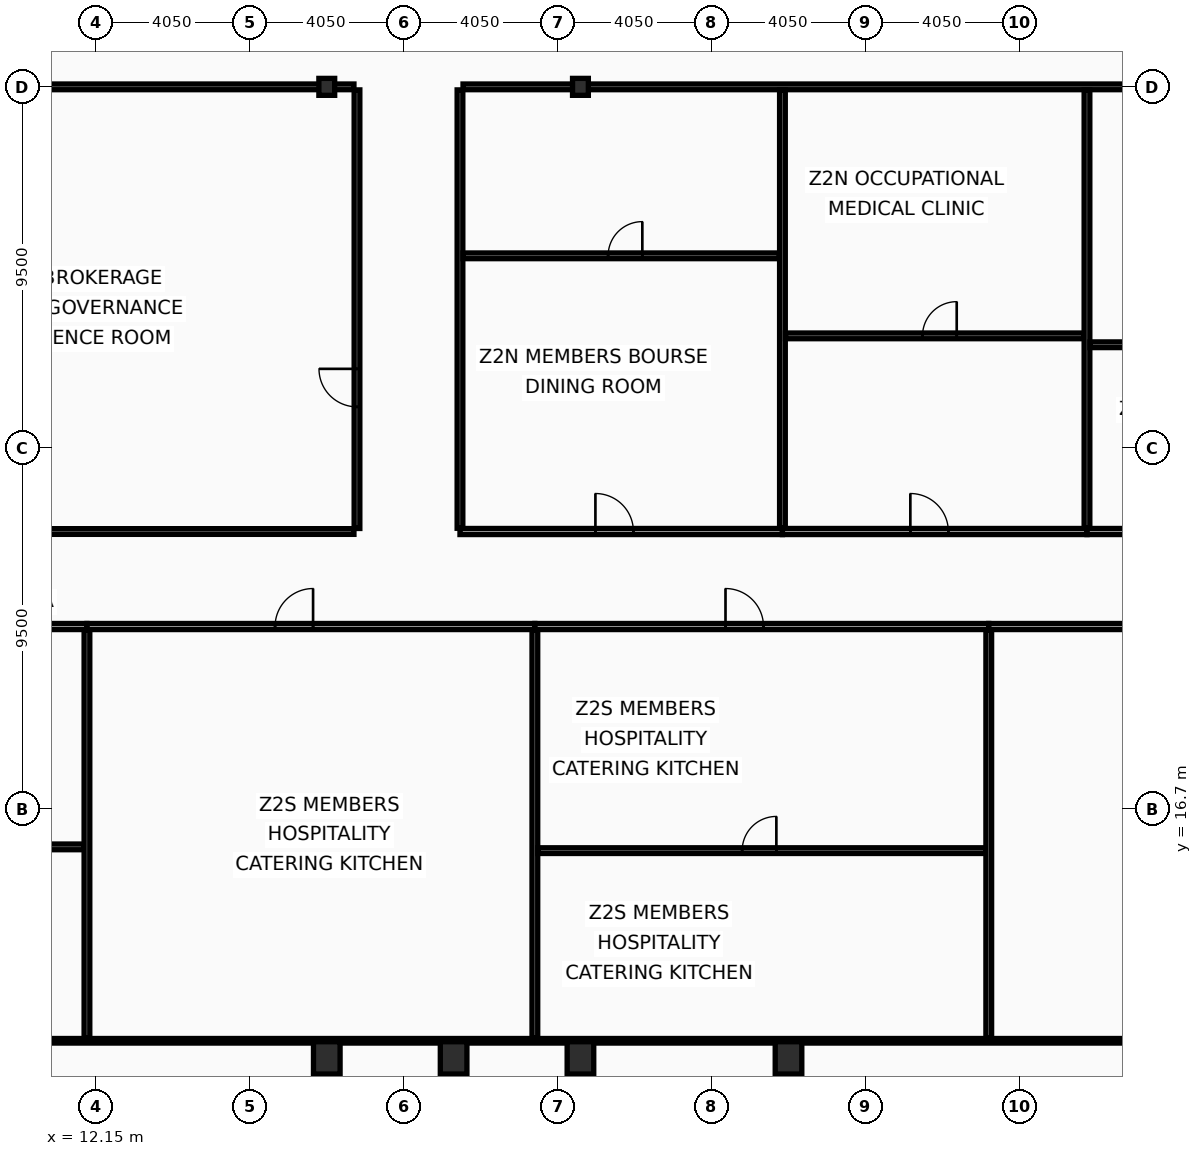
"""IFC4 building model, lengths in metres.
Left out: names, types, materials, properties, quantities, classifications, styles, units other than length and angle.
Written with IfcOpenShell. Run it as: python <this file> out.ifc"""

import sys

from ifc_helpers import new_model, si_unit, direction, frame, frame_2d, origin, origin_2d, place, context, subcontext, project, spatial, rectangle, hollow_rectangle, i_section, extrude, element, fill, save


model = new_model("IFC4")
c1 = context("Model", 3, precision=1e-05, world=origin(), true_north=direction((0.0, 1.0)))
c2 = subcontext(c1, "Body", "Model", "MODEL_VIEW")
j1 = project(units=[si_unit("LENGTHUNIT", "METRE"), si_unit("PLANEANGLEUNIT", "RADIAN")], contexts=[c1])
p1 = place(None, origin())
s1 = spatial("IfcSite", under=j1, at=p1, CompositionType="ELEMENT")
p2 = place(p1, origin())
s2 = spatial("IfcBuilding", under=s1, at=p2, CompositionType="ELEMENT")
p3 = place(p2, frame((0.0, 0.0, 129.0)))
s3 = spatial("IfcBuildingStorey", under=s2, at=p3, CompositionType="ELEMENT", Elevation=129.0)
for number, where, z_axis, x_axis in (
    (1, (18.225, 10.15, 0.0), (0.0, 0.0, 1.0), (1.0, 0.0, 0.0)),
    (2, (21.562, 10.15, 0.0), (0.0, 0.0, 1.0), (1.0, 0.0, 0.0)),
    (3, (24.9, 10.15, 0.0), (0.0, 0.0, 1.0), (1.0, 0.0, 0.0)),
    (4, (30.375, 10.15, 0.0), (0.0, 0.0, 1.0), (1.0, 0.0, 0.0)),
):
    element("IfcColumn", number, at=place(p3, frame(where, z_axis=z_axis, x_axis=x_axis)), inside=s3, PredefinedType="COLUMN", context=c2, shape_type="SweptSolid", body=[
        extrude(hollow_rectangle(XDim=0.7, YDim=0.85, WallThickness=0.05, at=origin_2d()), origin(), (0.0, 0.0, 1.0), 3.6),
    ])
for number, where, z_axis, x_axis in (
    (5, (18.225, 35.7, 0.0), (0.0, 0.0, 1.0), (1.0, 0.0, 0.0)),
    (6, (24.9, 35.7, 0.0), (0.0, 0.0, 1.0), (1.0, 0.0, 0.0)),
):
    element("IfcColumn", number, at=place(p3, frame(where, z_axis=z_axis, x_axis=x_axis)), inside=s3, PredefinedType="COLUMN", context=c2, shape_type="SweptSolid", body=[
        extrude(i_section(OverallWidth=0.416, OverallDepth=0.446, WebThickness=0.039, FlangeThickness=0.063, at=origin_2d()), origin(), (0.0, 0.0, 1.0), 3.6),
    ])
p4 = place(p3, frame((4.03, 21.5, 0.0), z_axis=(0.0, 0.0, 1.0), x_axis=(1.0, 0.0, 0.0)))
e7 = element("IfcWall", 7, at=p4, inside=s3, PredefinedType="PARTITIONING", context=c2, shape_type="SweptSolid", body=[
    extrude(rectangle(XDim=7.884, YDim=0.16, at=frame_2d((3.942, 0.0))), origin(), (0.0, 0.0, 1.0), 3.44),
])
p5 = place(p4, frame((3.311, 0.0, 0.0)))
e8 = element("IfcOpeningElement", 8, at=p5, cuts=e7, PredefinedType="OPENING", context=c2, shape_type="SweptSolid", body=[
    extrude(rectangle(XDim=1.0, YDim=2.05, at=frame_2d((0.5, 1.025))), frame((0.0, 0.09, 0.0), z_axis=(0.0, -1.0, 0.0), x_axis=(1.0, 0.0, 0.0)), (0.0, 0.0, 1.0), 0.18),
])
p6 = place(p3, frame((4.095, 15.702, 0.0), z_axis=(0.0, 0.0, 1.0), x_axis=(1.0, 0.0, 0.0)))
e9 = element("IfcWall", 9, at=p6, inside=s3, PredefinedType="PARTITIONING", context=c2, shape_type="SweptSolid", body=[
    extrude(rectangle(XDim=7.739, YDim=0.15, at=frame_2d((3.87, 0.0))), origin(), (0.0, 0.0, 1.0), 2.83),
])
p7 = place(p6, frame((3.548, 0.0, 0.0)))
e10 = element("IfcOpeningElement", 10, at=p7, cuts=e9, PredefinedType="OPENING", context=c2, shape_type="SweptSolid", body=[
    extrude(rectangle(XDim=0.9, YDim=2.05, at=frame_2d((0.45, 1.025))), frame((0.0, 0.085, 0.0), z_axis=(0.0, -1.0, 0.0), x_axis=(1.0, 0.0, 0.0)), (0.0, 0.0, 1.0), 0.17),
])
p8 = place(p3, frame((11.914, 21.5, 0.0), z_axis=(0.0, 0.0, 1.0), x_axis=(1.0, 0.0, 0.0)))
e11 = element("IfcWall", 11, at=p8, inside=s3, PredefinedType="PARTITIONING", context=c2, shape_type="SweptSolid", body=[
    extrude(rectangle(XDim=11.787, YDim=0.16, at=frame_2d((5.893, 0.0))), origin(), (0.0, 0.0, 1.0), 2.73),
])
p9 = place(p8, frame((4.95, 0.0, 0.0)))
e12 = element("IfcOpeningElement", 12, at=p9, cuts=e11, PredefinedType="OPENING", context=c2, shape_type="SweptSolid", body=[
    extrude(rectangle(XDim=1.0, YDim=2.05, at=frame_2d((0.5, 1.025))), frame((0.0, 0.09, 0.0), z_axis=(0.0, -1.0, 0.0), x_axis=(1.0, 0.0, 0.0)), (0.0, 0.0, 1.0), 0.18),
])
p10 = place(p3, frame((11.914, 10.665, 0.0), z_axis=(0.0, 0.0, 1.0), x_axis=(0.0, 1.0, 0.0)))
e13 = element("IfcWall", 13, at=p10, inside=s3, PredefinedType="PARTITIONING", context=c2, shape_type="SweptSolid", body=[
    extrude(rectangle(XDim=10.75, YDim=0.15, at=frame_2d((5.375, 0.0))), origin(), (0.0, 0.0, 1.0), 2.73),
])
p11 = place(p3, frame((23.701, 21.5, 0.0), z_axis=(0.0, 0.0, 1.0), x_axis=(1.0, 0.0, 0.0)))
e14 = element("IfcWall", 14, at=p11, inside=s3, PredefinedType="PARTITIONING", context=c2, shape_type="SweptSolid", body=[
    extrude(rectangle(XDim=11.944, YDim=0.16, at=frame_2d((5.972, 0.0))), origin(), (0.0, 0.0, 1.0), 2.73),
])
p12 = place(p11, frame((5.016, 0.0, 0.0)))
e15 = element("IfcOpeningElement", 15, at=p12, cuts=e14, PredefinedType="OPENING", context=c2, shape_type="SweptSolid", body=[
    extrude(rectangle(XDim=1.0, YDim=2.05, at=frame_2d((0.5, 1.025))), frame((0.0, 0.09, 0.0), z_axis=(0.0, -1.0, 0.0), x_axis=(1.0, 0.0, 0.0)), (0.0, 0.0, 1.0), 0.18),
])
p13 = place(p3, frame((23.701, 10.665, 0.0), z_axis=(0.0, 0.0, 1.0), x_axis=(0.0, 1.0, 0.0)))
e16 = element("IfcWall", 16, at=p13, inside=s3, PredefinedType="PARTITIONING", context=c2, shape_type="SweptSolid", body=[
    extrude(rectangle(XDim=10.75, YDim=0.15, at=frame_2d((5.375, 0.0))), origin(), (0.0, 0.0, 1.0), 2.88),
])
p14 = place(p3, frame((23.781, 15.603, 0.0), z_axis=(0.0, 0.0, 1.0), x_axis=(1.0, 0.0, 0.0)))
e17 = element("IfcWall", 17, at=p14, inside=s3, PredefinedType="PARTITIONING", context=c2, shape_type="SweptSolid", body=[
    extrude(rectangle(XDim=11.784, YDim=0.15, at=frame_2d((5.892, 0.0))), origin(), (0.0, 0.0, 1.0), 2.73),
])
p15 = place(p14, frame((5.375, 0.0, 0.0)))
e18 = element("IfcOpeningElement", 18, at=p15, cuts=e17, PredefinedType="OPENING", context=c2, shape_type="SweptSolid", body=[
    extrude(rectangle(XDim=0.9, YDim=2.05, at=frame_2d((0.45, 1.025))), frame((0.0, 0.085, 0.0), z_axis=(0.0, -1.0, 0.0), x_axis=(1.0, 0.0, 0.0)), (0.0, 0.0, 1.0), 0.17),
])
p16 = place(p3, frame((35.645, 21.5, 0.0), z_axis=(0.0, 0.0, 1.0), x_axis=(1.0, 0.0, 0.0)))
e19 = element("IfcWall", 19, at=p16, inside=s3, PredefinedType="PARTITIONING", context=c2, shape_type="SweptSolid", body=[
    extrude(rectangle(XDim=16.763, YDim=0.16, at=frame_2d((8.382, 0.0))), origin(), (0.0, 0.0, 1.0), 2.73),
])
p17 = place(p16, frame((7.041, 0.0, 0.0)))
e20 = element("IfcOpeningElement", 20, at=p17, cuts=e19, PredefinedType="OPENING", context=c2, shape_type="SweptSolid", body=[
    extrude(rectangle(XDim=1.6, YDim=2.15, at=frame_2d((0.8, 1.075))), frame((0.0, 0.09, 0.0), z_axis=(0.0, -1.0, 0.0), x_axis=(1.0, 0.0, 0.0)), (0.0, 0.0, 1.0), 0.18),
])
p18 = place(p3, frame((35.645, 10.665, 0.0), z_axis=(0.0, 0.0, 1.0), x_axis=(0.0, 1.0, 0.0)))
e21 = element("IfcWall", 21, at=p18, inside=s3, PredefinedType="PARTITIONING", context=c2, shape_type="SweptSolid", body=[
    extrude(rectangle(XDim=10.75, YDim=0.15, at=frame_2d((5.375, 0.0))), origin(), (0.0, 0.0, 1.0), 2.88),
])
p19 = place(p3, frame((19.02, 24.08, 0.0), z_axis=(0.0, 0.0, 1.0), x_axis=(0.0, 1.0, 0.0)))
e22 = element("IfcWall", 22, at=p19, inside=s3, PredefinedType="PARTITIONING", context=c2, shape_type="SweptSolid", body=[
    extrude(rectangle(XDim=11.54, YDim=0.15, at=frame_2d((5.77, 0.0))), origin(), (0.0, 0.0, 1.0), 2.88),
])
p20 = place(p19, frame((3.2, 0.0, 0.0)))
e23 = element("IfcOpeningElement", 23, at=p20, cuts=e22, PredefinedType="OPENING", context=c2, shape_type="SweptSolid", body=[
    extrude(rectangle(XDim=1.0, YDim=2.05, at=frame_2d((0.5, 1.025))), frame((0.0, 0.085, 0.0), z_axis=(0.0, -1.0, 0.0), x_axis=(1.0, 0.0, 0.0)), (0.0, 0.0, 1.0), 0.17),
])
for number, where, z_axis, x_axis in (
    (24, (4.095, 24.0, 0.0), (0.0, 0.0, 1.0), (1.0, 0.0, 0.0)),
    (25, (4.095, 35.7, 0.0), (0.0, 0.0, 1.0), (1.0, 0.0, 0.0)),
):
    element("IfcWall", number, at=place(p3, frame(where, z_axis=z_axis, x_axis=x_axis)), inside=s3, PredefinedType="PARTITIONING", context=c2, shape_type="SweptSolid", body=[
        extrude(rectangle(XDim=14.845, YDim=0.15, at=frame_2d((7.422, 0.0))), origin(), (0.0, 0.0, 1.0), 2.73),
    ])
p21 = place(p3, frame((21.73, 24.085, 0.0), z_axis=(0.0, 0.0, 1.0), x_axis=(0.0, 1.0, 0.0)))
e26 = element("IfcWall", 26, at=p21, inside=s3, PredefinedType="PARTITIONING", context=c2, shape_type="SweptSolid", body=[
    extrude(rectangle(XDim=11.535, YDim=0.15, at=frame_2d((5.768, 0.0))), origin(), (0.0, 0.0, 1.0), 2.88),
])
p22 = place(p3, frame((21.81, 35.7, 0.0), z_axis=(0.0, 0.0, 1.0), x_axis=(1.0, 0.0, 0.0)))
e27 = element("IfcWall", 27, at=p22, inside=s3, PredefinedType="PARTITIONING", context=c2, shape_type="SweptSolid", body=[
    extrude(rectangle(XDim=46.995, YDim=0.15, at=frame_2d((23.498, 0.0))), origin(), (0.0, 0.0, 1.0), 2.73),
])
p23 = place(p3, frame((21.73, 24.0, 0.0), z_axis=(0.0, 0.0, 1.0), x_axis=(1.0, 0.0, 0.0)))
e28 = element("IfcWall", 28, at=p23, inside=s3, PredefinedType="PARTITIONING", context=c2, shape_type="SweptSolid", body=[
    extrude(rectangle(XDim=8.485, YDim=0.16, at=frame_2d((4.243, 0.0))), origin(), (0.0, 0.0, 1.0), 2.73),
])
p24 = place(p23, frame((3.564, 0.0, 0.0)))
e29 = element("IfcOpeningElement", 29, at=p24, cuts=e28, PredefinedType="OPENING", context=c2, shape_type="SweptSolid", body=[
    extrude(rectangle(XDim=1.0, YDim=2.05, at=frame_2d((0.5, 1.025))), frame((0.0, 0.09, 0.0), z_axis=(0.0, -1.0, 0.0), x_axis=(1.0, 0.0, 0.0)), (0.0, 0.0, 1.0), 0.18),
])
p25 = place(p3, frame((21.81, 31.254, 0.0), z_axis=(0.0, 0.0, 1.0), x_axis=(1.0, 0.0, 0.0)))
e30 = element("IfcWall", 30, at=p25, inside=s3, PredefinedType="PARTITIONING", context=c2, shape_type="SweptSolid", body=[
    extrude(rectangle(XDim=8.325, YDim=0.15, at=frame_2d((4.163, 0.0))), origin(), (0.0, 0.0, 1.0), 2.73),
])
p26 = place(p25, frame((3.818, 0.0, 0.0)))
e31 = element("IfcOpeningElement", 31, at=p26, cuts=e30, PredefinedType="OPENING", context=c2, shape_type="SweptSolid", body=[
    extrude(rectangle(XDim=0.9, YDim=2.05, at=frame_2d((0.45, 1.025))), frame((0.0, 0.085, 0.0), z_axis=(0.0, -1.0, 0.0), x_axis=(1.0, 0.0, 0.0)), (0.0, 0.0, 1.0), 0.17),
])
p27 = place(p3, frame((30.215, 24.0, 0.0), z_axis=(0.0, 0.0, 1.0), x_axis=(1.0, 0.0, 0.0)))
e32 = element("IfcWall", 32, at=p27, inside=s3, PredefinedType="PARTITIONING", context=c2, shape_type="SweptSolid", body=[
    extrude(rectangle(XDim=8.014, YDim=0.16, at=frame_2d((4.007, 0.0))), origin(), (0.0, 0.0, 1.0), 2.73),
])
p28 = place(p27, frame((3.366, 0.0, 0.0)))
e33 = element("IfcOpeningElement", 33, at=p28, cuts=e32, PredefinedType="OPENING", context=c2, shape_type="SweptSolid", body=[
    extrude(rectangle(XDim=1.0, YDim=2.05, at=frame_2d((0.5, 1.025))), frame((0.0, 0.09, 0.0), z_axis=(0.0, -1.0, 0.0), x_axis=(1.0, 0.0, 0.0)), (0.0, 0.0, 1.0), 0.18),
])
p29 = place(p3, frame((30.215, 24.085, 0.0), z_axis=(0.0, 0.0, 1.0), x_axis=(0.0, 1.0, 0.0)))
e34 = element("IfcWall", 34, at=p29, inside=s3, PredefinedType="PARTITIONING", context=c2, shape_type="SweptSolid", body=[
    extrude(rectangle(XDim=11.535, YDim=0.15, at=frame_2d((5.768, 0.0))), origin(), (0.0, 0.0, 1.0), 2.73),
])
p30 = place(p3, frame((30.295, 29.148, 0.0), z_axis=(0.0, 0.0, 1.0), x_axis=(1.0, 0.0, 0.0)))
e35 = element("IfcWall", 35, at=p30, inside=s3, PredefinedType="PARTITIONING", context=c2, shape_type="SweptSolid", body=[
    extrude(rectangle(XDim=7.854, YDim=0.15, at=frame_2d((3.927, 0.0))), origin(), (0.0, 0.0, 1.0), 2.73),
])
p31 = place(p30, frame((3.606, 0.0, 0.0)))
e36 = element("IfcOpeningElement", 36, at=p31, cuts=e35, PredefinedType="OPENING", context=c2, shape_type="SweptSolid", body=[
    extrude(rectangle(XDim=0.9, YDim=2.05, at=frame_2d((0.45, 1.025))), frame((0.0, 0.085, 0.0), z_axis=(0.0, -1.0, 0.0), x_axis=(1.0, 0.0, 0.0)), (0.0, 0.0, 1.0), 0.17),
])
p32 = place(p3, frame((38.229, 24.0, 0.0), z_axis=(0.0, 0.0, 1.0), x_axis=(1.0, 0.0, 0.0)))
e37 = element("IfcWall", 37, at=p32, inside=s3, PredefinedType="PARTITIONING", context=c2, shape_type="SweptSolid", body=[
    extrude(rectangle(XDim=14.613, YDim=0.16, at=frame_2d((7.307, 0.0))), origin(), (0.0, 0.0, 1.0), 2.73),
])
p33 = place(p32, frame((6.138, 0.0, 0.0)))
e38 = element("IfcOpeningElement", 38, at=p33, cuts=e37, PredefinedType="OPENING", context=c2, shape_type="SweptSolid", body=[
    extrude(rectangle(XDim=1.6, YDim=2.15, at=frame_2d((0.8, 1.075))), frame((0.0, 0.09, 0.0), z_axis=(0.0, -1.0, 0.0), x_axis=(1.0, 0.0, 0.0)), (0.0, 0.0, 1.0), 0.18),
])
p34 = place(p3, frame((38.229, 24.085, 0.0), z_axis=(0.0, 0.0, 1.0), x_axis=(0.0, 1.0, 0.0)))
e39 = element("IfcWall", 39, at=p34, inside=s3, PredefinedType="PARTITIONING", context=c2, shape_type="SweptSolid", body=[
    extrude(rectangle(XDim=11.535, YDim=0.15, at=frame_2d((5.768, 0.0))), origin(), (0.0, 0.0, 1.0), 2.88),
])
p35 = place(p3, frame((38.309, 28.914, 0.0), z_axis=(0.0, 0.0, 1.0), x_axis=(1.0, 0.0, 0.0)))
e40 = element("IfcWall", 40, at=p35, inside=s3, PredefinedType="PARTITIONING", context=c2, shape_type="SweptSolid", body=[
    extrude(rectangle(XDim=14.453, YDim=0.15, at=frame_2d((7.227, 0.0))), origin(), (0.0, 0.0, 1.0), 2.73),
])
p36 = place(p35, frame((6.576, 0.0, 0.0)))
e41 = element("IfcOpeningElement", 41, at=p36, cuts=e40, PredefinedType="OPENING", context=c2, shape_type="SweptSolid", body=[
    extrude(rectangle(XDim=0.9, YDim=2.05, at=frame_2d((0.45, 1.025))), frame((0.0, 0.085, 0.0), z_axis=(0.0, -1.0, 0.0), x_axis=(1.0, 0.0, 0.0)), (0.0, 0.0, 1.0), 0.17),
])
p37 = place(p3, frame((4.095, 10.6, 0.0), z_axis=(0.0, 0.0, 1.0), x_axis=(1.0, 0.0, 0.0)))
e42 = element("IfcWall", 42, at=p37, inside=s3, PredefinedType="PARTITIONING", context=c2, shape_type="SweptSolid", body=[
    extrude(rectangle(XDim=64.71, YDim=0.12, at=frame_2d((32.355, 0.0))), origin(), (0.0, 0.0, 1.0), 2.73),
])
p38 = place(p9, origin())
e43 = element("IfcDoor", 43, at=p38, inside=s3, OperationType="SINGLE_SWING_RIGHT", PredefinedType="DOOR", context=c2, shape_type="SweptSolid", body=[
    extrude(rectangle(XDim=1.0, YDim=2.05, at=frame_2d((0.5, 1.025))), frame((0.0, 0.025, 0.0), z_axis=(0.0, -1.0, 0.0), x_axis=(1.0, 0.0, 0.0)), (0.0, 0.0, 1.0), 0.05),
])
fill(e12, e43)
p39 = place(p12, origin())
e44 = element("IfcDoor", 44, at=p39, inside=s3, OperationType="SINGLE_SWING_LEFT", PredefinedType="DOOR", context=c2, shape_type="SweptSolid", body=[
    extrude(rectangle(XDim=1.0, YDim=2.05, at=frame_2d((0.5, 1.025))), frame((0.0, 0.025, 0.0), z_axis=(0.0, -1.0, 0.0), x_axis=(1.0, 0.0, 0.0)), (0.0, 0.0, 1.0), 0.05),
])
fill(e15, e44)
p40 = place(p15, origin())
e45 = element("IfcDoor", 45, at=p40, inside=s3, OperationType="SINGLE_SWING_RIGHT", PredefinedType="DOOR", context=c2, shape_type="SweptSolid", body=[
    extrude(rectangle(XDim=0.9, YDim=2.05, at=frame_2d((0.45, 1.025))), frame((0.0, 0.025, 0.0), z_axis=(0.0, -1.0, 0.0), x_axis=(1.0, 0.0, 0.0)), (0.0, 0.0, 1.0), 0.05),
])
fill(e18, e45)
p41 = place(p20, origin())
e46 = element("IfcDoor", 46, at=p41, inside=s3, OperationType="SINGLE_SWING_RIGHT", PredefinedType="DOOR", context=c2, shape_type="SweptSolid", body=[
    extrude(rectangle(XDim=1.0, YDim=2.05, at=frame_2d((0.5, 1.025))), frame((0.0, 0.025, 0.0), z_axis=(0.0, -1.0, 0.0), x_axis=(1.0, 0.0, 0.0)), (0.0, 0.0, 1.0), 0.05),
])
fill(e23, e46)
p42 = place(p24, origin())
e47 = element("IfcDoor", 47, at=p42, inside=s3, OperationType="SINGLE_SWING_LEFT", PredefinedType="DOOR", context=c2, shape_type="SweptSolid", body=[
    extrude(rectangle(XDim=1.0, YDim=2.05, at=frame_2d((0.5, 1.025))), frame((0.0, 0.025, 0.0), z_axis=(0.0, -1.0, 0.0), x_axis=(1.0, 0.0, 0.0)), (0.0, 0.0, 1.0), 0.05),
])
fill(e29, e47)
p43 = place(p26, origin())
e48 = element("IfcDoor", 48, at=p43, inside=s3, OperationType="SINGLE_SWING_RIGHT", PredefinedType="DOOR", context=c2, shape_type="SweptSolid", body=[
    extrude(rectangle(XDim=0.9, YDim=2.05, at=frame_2d((0.45, 1.025))), frame((0.0, 0.025, 0.0), z_axis=(0.0, -1.0, 0.0), x_axis=(1.0, 0.0, 0.0)), (0.0, 0.0, 1.0), 0.05),
])
fill(e31, e48)
p44 = place(p28, origin())
e49 = element("IfcDoor", 49, at=p44, inside=s3, OperationType="SINGLE_SWING_LEFT", PredefinedType="DOOR", context=c2, shape_type="SweptSolid", body=[
    extrude(rectangle(XDim=1.0, YDim=2.05, at=frame_2d((0.5, 1.025))), frame((0.0, 0.025, 0.0), z_axis=(0.0, -1.0, 0.0), x_axis=(1.0, 0.0, 0.0)), (0.0, 0.0, 1.0), 0.05),
])
fill(e33, e49)
p45 = place(p31, origin())
e50 = element("IfcDoor", 50, at=p45, inside=s3, OperationType="SINGLE_SWING_RIGHT", PredefinedType="DOOR", context=c2, shape_type="SweptSolid", body=[
    extrude(rectangle(XDim=0.9, YDim=2.05, at=frame_2d((0.45, 1.025))), frame((0.0, 0.025, 0.0), z_axis=(0.0, -1.0, 0.0), x_axis=(1.0, 0.0, 0.0)), (0.0, 0.0, 1.0), 0.05),
])
fill(e36, e50)
save(model, sys.argv[1])
